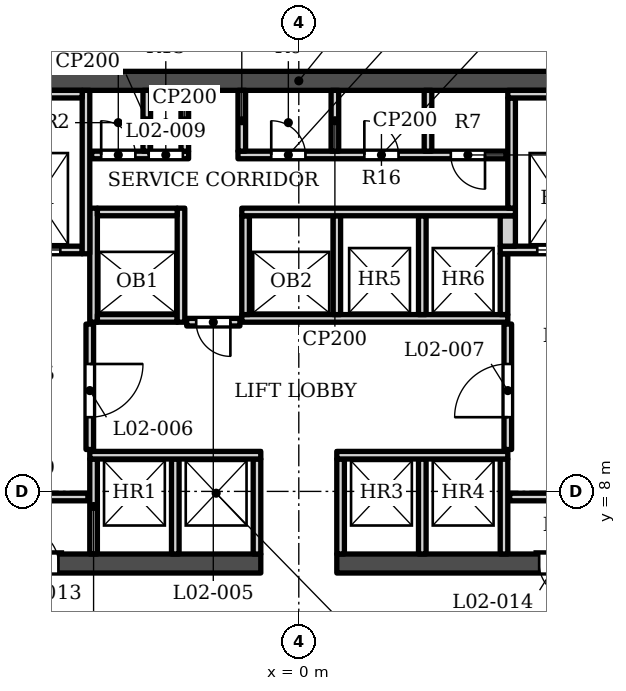
"""IFC4 building model, lengths in metres.
Left out: names, types, materials, properties, quantities, classifications, styles, units other than length and angle.
Written with IfcOpenShell. Run it as: python <this file> out.ifc"""

import sys

from ifc_helpers import new_model, si_unit, direction, frame, frame_2d, origin, place, context, subcontext, project, spatial, rectangle, extrude, element, fill, save


model = new_model("IFC4")
c1 = context("Model", 3, precision=1e-05, world=origin(), true_north=direction((0.0, 1.0)))
c2 = subcontext(c1, "Body", "Model", "MODEL_VIEW")
j1 = project(units=[si_unit("LENGTHUNIT", "METRE"), si_unit("PLANEANGLEUNIT", "RADIAN")], contexts=[c1])
p1 = place(None, origin())
s1 = spatial("IfcSite", under=j1, at=p1, CompositionType="ELEMENT")
p2 = place(p1, origin())
s2 = spatial("IfcBuilding", under=s1, at=p2, CompositionType="ELEMENT")
p3 = place(p2, frame((0.0, 0.0, 20.0)))
s3 = spatial("IfcBuildingStorey", under=s2, at=p3, CompositionType="ELEMENT", Elevation=20.0)
p4 = place(p3, frame((-16.9, 18.802, 0.0), z_axis=(0.0, 0.0, 1.0), x_axis=(1.0, 0.0, 0.0)))
e1 = element("IfcWall", 1, at=p4, inside=s3, PredefinedType="SHEAR", context=c2, shape_type="SweptSolid", body=[
    extrude(rectangle(XDim=33.8, YDim=0.5, at=frame_2d((16.9, 0.0))), origin(), (0.0, 0.0, 1.0), 9.0),
])
p5 = place(p3, frame((-8.05, 6.103, 0.0), z_axis=(0.0, 0.0, 1.0), x_axis=(1.0, 0.0, 0.0)))
e2 = element("IfcWall", 2, at=p5, inside=s3, PredefinedType="SHEAR", context=c2, shape_type="SweptSolid", body=[
    extrude(rectangle(XDim=7.05, YDim=0.5, at=frame_2d((3.525, 0.0))), origin(), (0.0, 0.0, 1.0), 9.0),
])
p6 = place(p5, frame((0.825, 0.0, 0.0)))
e3 = element("IfcOpeningElement", 3, at=p6, cuts=e2, PredefinedType="OPENING", context=c2, shape_type="SweptSolid", body=[
    extrude(rectangle(XDim=0.9, YDim=2.1, at=frame_2d((0.45, 1.05))), frame((0.0, 0.26, 0.0), z_axis=(0.0, -1.0, 0.0), x_axis=(1.0, 0.0, 0.0)), (0.0, 0.0, 1.0), 0.52),
])
p7 = place(p3, frame((1.0, 6.103, 0.0), z_axis=(0.0, 0.0, 1.0), x_axis=(1.0, 0.0, 0.0)))
e4 = element("IfcWall", 4, at=p7, inside=s3, PredefinedType="SHEAR", context=c2, shape_type="SweptSolid", body=[
    extrude(rectangle(XDim=7.05, YDim=0.5, at=frame_2d((3.525, 0.0))), origin(), (0.0, 0.0, 1.0), 9.0),
])
p8 = place(p7, frame((5.325, 0.0, 0.0)))
e5 = element("IfcOpeningElement", 5, at=p8, cuts=e4, PredefinedType="OPENING", context=c2, shape_type="SweptSolid", body=[
    extrude(rectangle(XDim=0.9, YDim=2.1, at=frame_2d((0.45, 1.05))), frame((0.0, 0.26, 0.0), z_axis=(0.0, -1.0, 0.0), x_axis=(1.0, 0.0, 0.0)), (0.0, 0.0, 1.0), 0.52),
])
for number, where, z_axis, x_axis in (
    (6, (-5.4, 6.353, 0.0), (0.0, 0.0, 1.0), (0.0, 1.0, 0.0)),
    (7, (-3.25, 6.353, 0.0), (0.0, 0.0, 1.0), (0.0, 1.0, 0.0)),
    (8, (-1.1, 6.353, 0.0), (0.0, 0.0, 1.0), (0.0, 1.0, 0.0)),
    (9, (1.1, 6.353, 0.0), (0.0, 0.0, 1.0), (0.0, 1.0, 0.0)),
    (10, (3.25, 6.353, 0.0), (0.0, 0.0, 1.0), (0.0, 1.0, 0.0)),
    (11, (5.4, 6.353, 0.0), (0.0, 0.0, 1.0), (0.0, 1.0, 0.0)),
    (12, (-8.05, 7.853, 0.0), (0.0, 0.0, 1.0), (1.0, 0.0, 0.0)),
    (13, (5.55, 7.853, 0.0), (0.0, 0.0, 1.0), (1.0, 0.0, 0.0)),
):
    element("IfcWall", number, at=place(p3, frame(where, z_axis=z_axis, x_axis=x_axis)), inside=s3, PredefinedType="SOLIDWALL", context=c2, shape_type="SweptSolid", body=[
        extrude(rectangle(XDim=2.5, YDim=0.2, at=frame_2d((1.25, 0.0))), origin(), (0.0, 0.0, 1.0), 8.55),
    ])
for number, where, z_axis, x_axis in (
    (14, (-5.5, 8.953, 0.0), (0.0, 0.0, 1.0), (1.0, 0.0, 0.0)),
    (15, (1.0, 8.953, 0.0), (0.0, 0.0, 1.0), (1.0, 0.0, 0.0)),
):
    element("IfcWall", number, at=place(p3, frame(where, z_axis=z_axis, x_axis=x_axis)), inside=s3, PredefinedType="SOLIDWALL", context=c2, shape_type="SweptSolid", body=[
        extrude(rectangle(XDim=4.5, YDim=0.2, at=frame_2d((2.25, 0.0))), origin(), (0.0, 0.0, 1.0), 8.55),
    ])
p9 = place(p3, frame((-5.5, 9.103, 0.0), z_axis=(0.0, 0.0, 1.0), x_axis=(0.0, 1.0, 0.0)))
e16 = element("IfcWall", 16, at=p9, inside=s3, PredefinedType="SOLIDWALL", context=c2, shape_type="SweptSolid", body=[
    extrude(rectangle(XDim=3.3, YDim=0.2, at=frame_2d((1.65, 0.0))), origin(), (0.0, 0.0, 1.0), 8.55),
])
p10 = place(p9, frame((0.85, 0.0, 0.0)))
e17 = element("IfcOpeningElement", 17, at=p10, cuts=e16, PredefinedType="OPENING", context=c2, shape_type="SweptSolid", body=[
    extrude(rectangle(XDim=1.4, YDim=2.1, at=frame_2d((0.7, 1.05))), frame((0.0, 0.11, 0.0), z_axis=(0.0, -1.0, 0.0), x_axis=(1.0, 0.0, 0.0)), (0.0, 0.0, 1.0), 0.22),
])
p11 = place(p3, frame((5.5, 9.103, 0.0), z_axis=(0.0, 0.0, 1.0), x_axis=(0.0, 1.0, 0.0)))
e18 = element("IfcWall", 18, at=p11, inside=s3, PredefinedType="SOLIDWALL", context=c2, shape_type="SweptSolid", body=[
    extrude(rectangle(XDim=3.3, YDim=0.2, at=frame_2d((1.65, 0.0))), origin(), (0.0, 0.0, 1.0), 8.55),
])
p12 = place(p11, frame((0.85, 0.0, 0.0)))
e19 = element("IfcOpeningElement", 19, at=p12, cuts=e18, PredefinedType="OPENING", context=c2, shape_type="SweptSolid", body=[
    extrude(rectangle(XDim=1.4, YDim=2.1, at=frame_2d((0.7, 1.05))), frame((0.0, 0.11, 0.0), z_axis=(0.0, -1.0, 0.0), x_axis=(1.0, 0.0, 0.0)), (0.0, 0.0, 1.0), 0.22),
])
p13 = place(p3, frame((-2.95, 12.453, 0.0), z_axis=(0.0, 0.0, 1.0), x_axis=(1.0, 0.0, 0.0)))
e20 = element("IfcWall", 20, at=p13, inside=s3, PredefinedType="SOLIDWALL", context=c2, shape_type="SweptSolid", body=[
    extrude(rectangle(XDim=1.4, YDim=0.2, at=frame_2d((0.7, 0.0))), origin(), (0.0, 0.0, 1.0), 8.55),
])
p14 = place(p13, frame((0.25, 0.0, 0.0)))
e21 = element("IfcOpeningElement", 21, at=p14, cuts=e20, PredefinedType="OPENING", context=c2, shape_type="SweptSolid", body=[
    extrude(rectangle(XDim=0.9, YDim=2.1, at=frame_2d((0.45, 1.05))), frame((0.0, 0.11, 0.0), z_axis=(0.0, -1.0, 0.0), x_axis=(1.0, 0.0, 0.0)), (0.0, 0.0, 1.0), 0.22),
])
p15 = place(p3, frame((-5.4, 12.453, 0.0), z_axis=(0.0, 0.0, 1.0), x_axis=(0.0, 1.0, 0.0)))
e22 = element("IfcWall", 22, at=p15, inside=s3, PredefinedType="SOLIDWALL", context=c2, shape_type="SweptSolid", body=[
    extrude(rectangle(XDim=3.0, YDim=0.2, at=frame_2d((1.5, 0.0))), origin(), (0.0, 0.0, 1.0), 8.55),
])
p16 = place(p3, frame((-5.3, 12.552, 0.0), z_axis=(0.0, 0.0, 1.0), x_axis=(1.0, 0.0, 0.0)))
e23 = element("IfcWall", 23, at=p16, inside=s3, PredefinedType="SOLIDWALL", context=c2, shape_type="SweptSolid", body=[
    extrude(rectangle(XDim=2.1, YDim=0.2, at=frame_2d((1.05, 0.0))), origin(), (0.0, 0.0, 1.0), 8.55),
])
p17 = place(p3, frame((-3.1, 12.453, 0.0), z_axis=(0.0, 0.0, 1.0), x_axis=(0.0, 1.0, 0.0)))
e24 = element("IfcWall", 24, at=p17, inside=s3, PredefinedType="SOLIDWALL", context=c2, shape_type="SweptSolid", body=[
    extrude(rectangle(XDim=3.0, YDim=0.2, at=frame_2d((1.5, 0.0))), origin(), (0.0, 0.0, 1.0), 8.55),
])
p18 = place(p3, frame((-1.5, 12.552, 0.0), z_axis=(0.0, 0.0, 1.0), x_axis=(1.0, 0.0, 0.0)))
e25 = element("IfcWall", 25, at=p18, inside=s3, PredefinedType="SOLIDWALL", context=c2, shape_type="SweptSolid", body=[
    extrude(rectangle(XDim=7.0, YDim=0.2, at=frame_2d((3.5, 0.0))), origin(), (0.0, 0.0, 1.0), 8.55),
])
for number, where, z_axis, x_axis in (
    (26, (-1.4, 12.653, 0.0), (0.0, 0.0, 1.0), (0.0, 1.0, 0.0)),
    (27, (1.0, 12.653, 0.0), (0.0, 0.0, 1.0), (0.0, 1.0, 0.0)),
    (28, (3.25, 12.653, 0.0), (0.0, 0.0, 1.0), (0.0, 1.0, 0.0)),
):
    element("IfcWall", number, at=place(p3, frame(where, z_axis=z_axis, x_axis=x_axis)), inside=s3, PredefinedType="SOLIDWALL", context=c2, shape_type="SweptSolid", body=[
        extrude(rectangle(XDim=2.6, YDim=0.2, at=frame_2d((1.3, 0.0))), origin(), (0.0, 0.0, 1.0), 8.55),
    ])
p19 = place(p3, frame((5.4, 12.653, 0.0), z_axis=(0.0, 0.0, 1.0), x_axis=(0.0, 1.0, 0.0)))
e29 = element("IfcWall", 29, at=p19, inside=s3, PredefinedType="SOLIDWALL", context=c2, shape_type="SweptSolid", body=[
    extrude(rectangle(XDim=1.6, YDim=0.2, at=frame_2d((0.8, 0.0))), origin(), (0.0, 0.0, 1.0), 8.55),
])
p20 = place(p3, frame((-8.05, 14.353, 0.0), z_axis=(0.0, 0.0, 1.0), x_axis=(1.0, 0.0, 0.0)))
e30 = element("IfcWall", 30, at=p20, inside=s3, PredefinedType="SOLIDWALL", context=c2, shape_type="SweptSolid", body=[
    extrude(rectangle(XDim=2.35, YDim=0.2, at=frame_2d((1.175, 0.0))), origin(), (0.0, 0.0, 1.0), 8.55),
])
p21 = place(p20, frame((0.575, 0.0, 0.0)))
e31 = element("IfcOpeningElement", 31, at=p21, cuts=e30, PredefinedType="OPENING", context=c2, shape_type="SweptSolid", body=[
    extrude(rectangle(XDim=1.2, YDim=2.1, at=frame_2d((0.6, 1.05))), frame((0.0, 0.11, 0.0), z_axis=(0.0, -1.0, 0.0), x_axis=(1.0, 0.0, 0.0)), (0.0, 0.0, 1.0), 0.22),
])
p22 = place(p3, frame((-5.6, 14.253, 0.0), z_axis=(0.0, 0.0, 1.0), x_axis=(0.0, 1.0, 0.0)))
e32 = element("IfcWall", 32, at=p22, inside=s3, PredefinedType="SOLIDWALL", context=c2, shape_type="SweptSolid", body=[
    extrude(rectangle(XDim=4.3, YDim=0.2, at=frame_2d((2.15, 0.0))), origin(), (0.0, 0.0, 1.0), 8.55),
])
p23 = place(p3, frame((5.3, 14.353, 0.0), z_axis=(0.0, 0.0, 1.0), x_axis=(1.0, 0.0, 0.0)))
e33 = element("IfcWall", 33, at=p23, inside=s3, PredefinedType="SOLIDWALL", context=c2, shape_type="SweptSolid", body=[
    extrude(rectangle(XDim=2.75, YDim=0.2, at=frame_2d((1.375, 0.0))), origin(), (0.0, 0.0, 1.0), 8.55),
])
p24 = place(p23, frame((0.975, 0.0, 0.0)))
e34 = element("IfcOpeningElement", 34, at=p24, cuts=e33, PredefinedType="OPENING", context=c2, shape_type="SweptSolid", body=[
    extrude(rectangle(XDim=1.2, YDim=2.1, at=frame_2d((0.6, 1.05))), frame((0.0, 0.11, 0.0), z_axis=(0.0, -1.0, 0.0), x_axis=(1.0, 0.0, 0.0)), (0.0, 0.0, 1.0), 0.22),
])
p25 = place(p3, frame((5.5, 14.453, 0.0), z_axis=(0.0, 0.0, 1.0), x_axis=(0.0, 1.0, 0.0)))
e35 = element("IfcWall", 35, at=p25, inside=s3, PredefinedType="SOLIDWALL", context=c2, shape_type="SweptSolid", body=[
    extrude(rectangle(XDim=0.8, YDim=0.4, at=frame_2d((0.4, 0.0))), origin(), (0.0, 0.0, 1.0), 8.55),
])
p26 = place(p3, frame((-5.3, 15.353, 0.0), z_axis=(0.0, 0.0, 1.0), x_axis=(1.0, 0.0, 0.0)))
e36 = element("IfcWall", 36, at=p26, inside=s3, PredefinedType="SOLIDWALL", context=c2, shape_type="SweptSolid", body=[
    extrude(rectangle(XDim=2.1, YDim=0.2, at=frame_2d((1.05, 0.0))), origin(), (0.0, 0.0, 1.0), 8.55),
])
p27 = place(p3, frame((-1.5, 15.353, 0.0), z_axis=(0.0, 0.0, 1.0), x_axis=(1.0, 0.0, 0.0)))
e37 = element("IfcWall", 37, at=p27, inside=s3, PredefinedType="SOLIDWALL", context=c2, shape_type="SweptSolid", body=[
    extrude(rectangle(XDim=7.2, YDim=0.2, at=frame_2d((3.6, 0.0))), origin(), (0.0, 0.0, 1.0), 8.55),
])
p28 = place(p3, frame((5.6, 15.453, 0.0), z_axis=(0.0, 0.0, 1.0), x_axis=(0.0, 1.0, 0.0)))
e38 = element("IfcWall", 38, at=p28, inside=s3, PredefinedType="SOLIDWALL", context=c2, shape_type="SweptSolid", body=[
    extrude(rectangle(XDim=2.9, YDim=0.2, at=frame_2d((1.45, 0.0))), origin(), (0.0, 0.0, 1.0), 8.55),
])
p29 = place(p3, frame((-5.45, 16.853, 0.0), z_axis=(0.0, 0.0, 1.0), x_axis=(1.0, 0.0, 0.0)))
e39 = element("IfcWall", 39, at=p29, inside=s3, PredefinedType="SOLIDWALL", context=c2, shape_type="SweptSolid", body=[
    extrude(rectangle(XDim=2.55, YDim=0.2, at=frame_2d((1.275, 0.0))), origin(), (0.0, 0.0, 1.0), 8.55),
])
p30 = place(p29, frame((0.25, 0.0, 0.0)))
e40 = element("IfcOpeningElement", 40, at=p30, cuts=e39, PredefinedType="OPENING", context=c2, shape_type="SweptSolid", body=[
    extrude(rectangle(XDim=0.9, YDim=2.1, at=frame_2d((0.45, 1.05))), frame((0.0, 0.11, 0.0), z_axis=(0.0, -1.0, 0.0), x_axis=(1.0, 0.0, 0.0)), (0.0, 0.0, 1.0), 0.22),
])
p31 = place(p29, frame((1.5, 0.0, 0.0)))
e41 = element("IfcOpeningElement", 41, at=p31, cuts=e39, PredefinedType="OPENING", context=c2, shape_type="SweptSolid", body=[
    extrude(rectangle(XDim=0.9, YDim=2.1, at=frame_2d((0.45, 1.05))), frame((0.0, 0.11, 0.0), z_axis=(0.0, -1.0, 0.0), x_axis=(1.0, 0.0, 0.0)), (0.0, 0.0, 1.0), 0.22),
])
p32 = place(p3, frame((-1.6, 16.853, 0.0), z_axis=(0.0, 0.0, 1.0), x_axis=(1.0, 0.0, 0.0)))
e42 = element("IfcWall", 42, at=p32, inside=s3, PredefinedType="SOLIDWALL", context=c2, shape_type="SweptSolid", body=[
    extrude(rectangle(XDim=7.05, YDim=0.2, at=frame_2d((3.525, 0.0))), origin(), (0.0, 0.0, 1.0), 8.55),
])
p33 = place(p32, frame((0.875, 0.0, 0.0)))
e43 = element("IfcOpeningElement", 43, at=p33, cuts=e42, PredefinedType="OPENING", context=c2, shape_type="SweptSolid", body=[
    extrude(rectangle(XDim=0.9, YDim=2.1, at=frame_2d((0.45, 1.05))), frame((0.0, 0.11, 0.0), z_axis=(0.0, -1.0, 0.0), x_axis=(1.0, 0.0, 0.0)), (0.0, 0.0, 1.0), 0.22),
])
p34 = place(p32, frame((3.325, 0.0, 0.0)))
e44 = element("IfcOpeningElement", 44, at=p34, cuts=e42, PredefinedType="OPENING", context=c2, shape_type="SweptSolid", body=[
    extrude(rectangle(XDim=0.9, YDim=2.1, at=frame_2d((0.45, 1.05))), frame((0.0, 0.11, 0.0), z_axis=(0.0, -1.0, 0.0), x_axis=(1.0, 0.0, 0.0)), (0.0, 0.0, 1.0), 0.22),
])
p35 = place(p32, frame((5.6, 0.0, 0.0)))
e45 = element("IfcOpeningElement", 45, at=p35, cuts=e42, PredefinedType="OPENING", context=c2, shape_type="SweptSolid", body=[
    extrude(rectangle(XDim=0.9, YDim=2.1, at=frame_2d((0.45, 1.05))), frame((0.0, 0.11, 0.0), z_axis=(0.0, -1.0, 0.0), x_axis=(1.0, 0.0, 0.0)), (0.0, 0.0, 1.0), 0.22),
])
for number, where, z_axis, x_axis in (
    (46, (-4.0, 16.953, 0.0), (0.0, 0.0, 1.0), (0.0, 1.0, 0.0)),
    (47, (-3.0, 16.953, 0.0), (0.0, 0.0, 1.0), (0.0, 1.0, 0.0)),
    (48, (-1.5, 16.953, 0.0), (0.0, 0.0, 1.0), (0.0, 1.0, 0.0)),
    (49, (0.95, 16.953, 0.0), (0.0, 0.0, 1.0), (0.0, 1.0, 0.0)),
    (50, (3.4, 16.953, 0.0), (0.0, 0.0, 1.0), (0.0, 1.0, 0.0)),
):
    element("IfcWall", number, at=place(p3, frame(where, z_axis=z_axis, x_axis=x_axis)), inside=s3, PredefinedType="PARTITIONING", context=c2, shape_type="SweptSolid", body=[
        extrude(rectangle(XDim=1.6, YDim=0.2, at=frame_2d((0.8, 0.0))), origin(), (0.0, 0.0, 1.0), 8.55),
    ])
p36 = place(p3, frame((-8.05, 18.453, 0.0), z_axis=(0.0, 0.0, 1.0), x_axis=(1.0, 0.0, 0.0)))
e51 = element("IfcWall", 51, at=p36, inside=s3, PredefinedType="SOLIDWALL", context=c2, shape_type="SweptSolid", body=[
    extrude(rectangle(XDim=2.35, YDim=0.2, at=frame_2d((1.175, 0.0))), origin(), (0.0, 0.0, 1.0), 8.55),
])
p37 = place(p3, frame((5.5, 18.453, 0.0), z_axis=(0.0, 0.0, 1.0), x_axis=(1.0, 0.0, 0.0)))
e52 = element("IfcWall", 52, at=p37, inside=s3, PredefinedType="SOLIDWALL", context=c2, shape_type="SweptSolid", body=[
    extrude(rectangle(XDim=2.55, YDim=0.2, at=frame_2d((1.275, 0.0))), origin(), (0.0, 0.0, 1.0), 8.55),
])
p38 = place(p21, origin())
e53 = element("IfcDoor", 53, at=p38, inside=s3, OperationType="DOUBLE_DOOR_SLIDING", PredefinedType="DOOR", context=c2, shape_type="SweptSolid", body=[
    extrude(rectangle(XDim=1.2, YDim=2.1, at=frame_2d((0.6, 1.05))), frame((0.0, 0.025, 0.0), z_axis=(0.0, -1.0, 0.0), x_axis=(1.0, 0.0, 0.0)), (0.0, 0.0, 1.0), 0.05),
])
fill(e31, e53)
p39 = place(p24, origin())
e54 = element("IfcDoor", 54, at=p39, inside=s3, OperationType="DOUBLE_DOOR_SLIDING", PredefinedType="DOOR", context=c2, shape_type="SweptSolid", body=[
    extrude(rectangle(XDim=1.2, YDim=2.1, at=frame_2d((0.6, 1.05))), frame((0.0, 0.025, 0.0), z_axis=(0.0, -1.0, 0.0), x_axis=(1.0, 0.0, 0.0)), (0.0, 0.0, 1.0), 0.05),
])
fill(e34, e54)
p40 = place(p14, origin())
e55 = element("IfcDoor", 55, at=p40, inside=s3, OperationType="SINGLE_SWING_RIGHT", PredefinedType="DOOR", context=c2, shape_type="SweptSolid", body=[
    extrude(rectangle(XDim=0.9, YDim=2.1, at=frame_2d((0.45, 1.05))), frame((0.0, 0.025, 0.0), z_axis=(0.0, -1.0, 0.0), x_axis=(1.0, 0.0, 0.0)), (0.0, 0.0, 1.0), 0.05),
])
fill(e21, e55)
p41 = place(p10, origin())
e56 = element("IfcDoor", 56, at=p41, inside=s3, OperationType="SINGLE_SWING_RIGHT", PredefinedType="DOOR", context=c2, shape_type="SweptSolid", body=[
    extrude(rectangle(XDim=1.4, YDim=2.1, at=frame_2d((0.7, 1.05))), frame((0.0, 0.025, 0.0), z_axis=(0.0, -1.0, 0.0), x_axis=(1.0, 0.0, 0.0)), (0.0, 0.0, 1.0), 0.05),
])
fill(e17, e56)
p42 = place(p12, origin())
e57 = element("IfcDoor", 57, at=p42, inside=s3, OperationType="SINGLE_SWING_LEFT", PredefinedType="DOOR", context=c2, shape_type="SweptSolid", body=[
    extrude(rectangle(XDim=1.4, YDim=2.1, at=frame_2d((0.7, 1.05))), frame((0.0, 0.025, 0.0), z_axis=(0.0, -1.0, 0.0), x_axis=(1.0, 0.0, 0.0)), (0.0, 0.0, 1.0), 0.05),
])
fill(e19, e57)
p43 = place(p30, origin())
e58 = element("IfcDoor", 58, at=p43, inside=s3, OperationType="SINGLE_SWING_LEFT", PredefinedType="DOOR", context=c2, shape_type="SweptSolid", body=[
    extrude(rectangle(XDim=0.9, YDim=2.1, at=frame_2d((0.45, 1.05))), frame((0.0, 0.025, 0.0), z_axis=(0.0, -1.0, 0.0), x_axis=(1.0, 0.0, 0.0)), (0.0, 0.0, 1.0), 0.05),
])
fill(e40, e58)
p44 = place(p31, origin())
e59 = element("IfcDoor", 59, at=p44, inside=s3, OperationType="SINGLE_SWING_LEFT", PredefinedType="DOOR", context=c2, shape_type="SweptSolid", body=[
    extrude(rectangle(XDim=0.9, YDim=2.1, at=frame_2d((0.45, 1.05))), frame((0.0, 0.025, 0.0), z_axis=(0.0, -1.0, 0.0), x_axis=(1.0, 0.0, 0.0)), (0.0, 0.0, 1.0), 0.05),
])
fill(e41, e59)
p45 = place(p33, origin())
e60 = element("IfcDoor", 60, at=p45, inside=s3, OperationType="SINGLE_SWING_LEFT", PredefinedType="DOOR", context=c2, shape_type="SweptSolid", body=[
    extrude(rectangle(XDim=0.9, YDim=2.1, at=frame_2d((0.45, 1.05))), frame((0.0, 0.025, 0.0), z_axis=(0.0, -1.0, 0.0), x_axis=(1.0, 0.0, 0.0)), (0.0, 0.0, 1.0), 0.05),
])
fill(e43, e60)
p46 = place(p34, origin())
e61 = element("IfcDoor", 61, at=p46, inside=s3, OperationType="SINGLE_SWING_LEFT", PredefinedType="DOOR", context=c2, shape_type="SweptSolid", body=[
    extrude(rectangle(XDim=0.9, YDim=2.1, at=frame_2d((0.45, 1.05))), frame((0.0, 0.025, 0.0), z_axis=(0.0, -1.0, 0.0), x_axis=(1.0, 0.0, 0.0)), (0.0, 0.0, 1.0), 0.05),
])
fill(e44, e61)
p47 = place(p35, origin())
e62 = element("IfcDoor", 62, at=p47, inside=s3, OperationType="SINGLE_SWING_RIGHT", PredefinedType="DOOR", context=c2, shape_type="SweptSolid", body=[
    extrude(rectangle(XDim=0.9, YDim=2.1, at=frame_2d((0.45, 1.05))), frame((0.0, 0.025, 0.0), z_axis=(0.0, -1.0, 0.0), x_axis=(1.0, 0.0, 0.0)), (0.0, 0.0, 1.0), 0.05),
])
fill(e45, e62)
p48 = place(p6, origin())
e63 = element("IfcDoor", 63, at=p48, inside=s3, OperationType="SINGLE_SWING_LEFT", PredefinedType="DOOR", context=c2, shape_type="SweptSolid", body=[
    extrude(rectangle(XDim=0.9, YDim=2.1, at=frame_2d((0.45, 1.05))), frame((0.0, 0.025, 0.0), z_axis=(0.0, -1.0, 0.0), x_axis=(1.0, 0.0, 0.0)), (0.0, 0.0, 1.0), 0.05),
])
fill(e3, e63)
p49 = place(p8, origin())
e64 = element("IfcDoor", 64, at=p49, inside=s3, OperationType="SINGLE_SWING_RIGHT", PredefinedType="DOOR", context=c2, shape_type="SweptSolid", body=[
    extrude(rectangle(XDim=0.9, YDim=2.1, at=frame_2d((0.45, 1.05))), frame((0.0, 0.025, 0.0), z_axis=(0.0, -1.0, 0.0), x_axis=(1.0, 0.0, 0.0)), (0.0, 0.0, 1.0), 0.05),
])
fill(e5, e64)
save(model, sys.argv[1])
